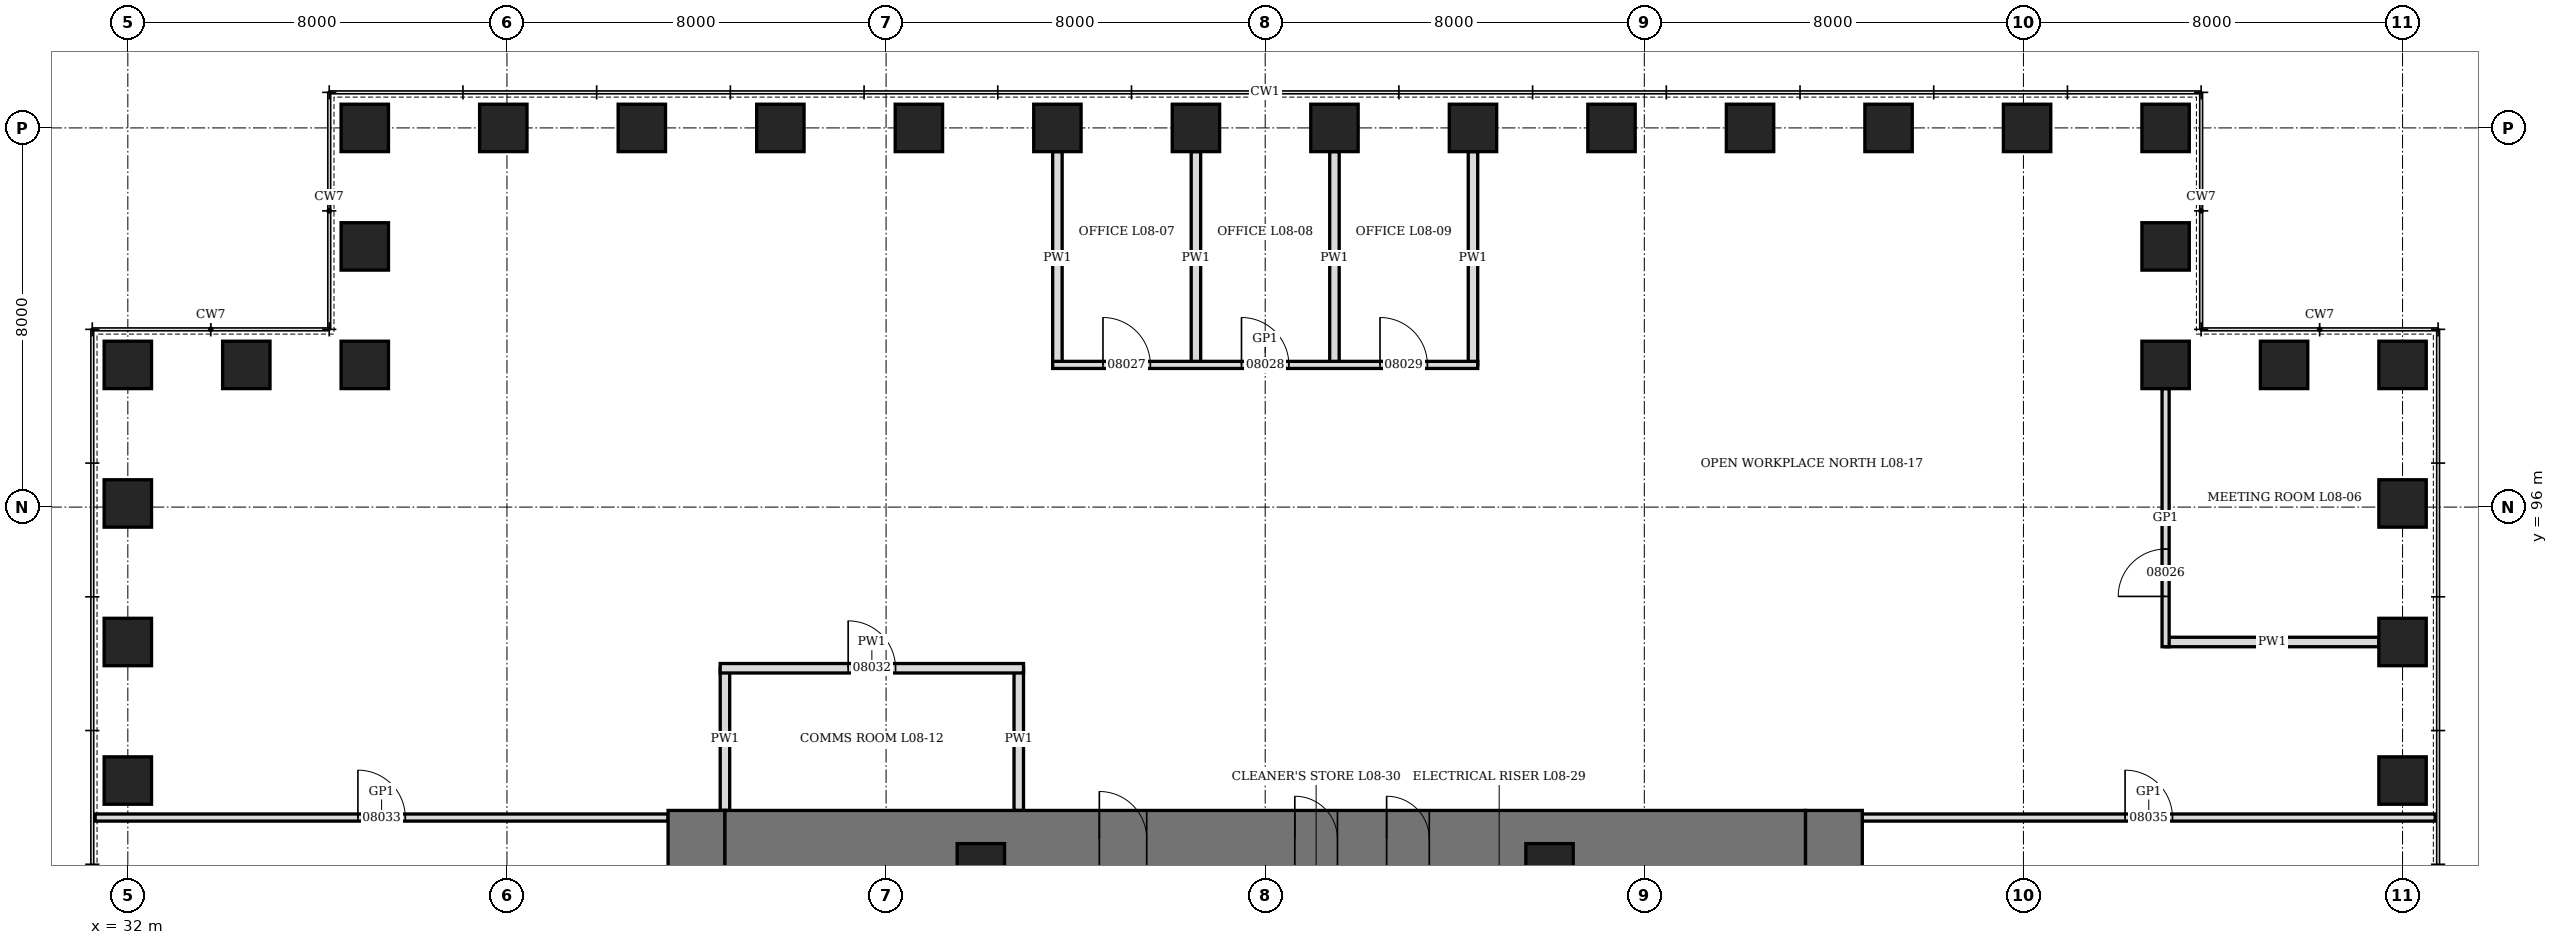
"""IFC4 building model, lengths in metres.
Left out: names, types, materials, properties, quantities, classifications, styles, units other than length and angle.
Written with IfcOpenShell. Run it as: python <this file> out.ifc"""

import sys

from ifc_helpers import new_model, si_unit, direction, frame, frame_2d, origin, origin_2d, place, context, subcontext, project, spatial, rectangle, hollow_rectangle, extrude, element, fill, save


model = new_model("IFC4")
c1 = context("Model", 3, precision=1e-05, world=origin(), true_north=direction((0.0, 1.0)))
c2 = subcontext(c1, "Body", "Model", "MODEL_VIEW")
j1 = project(units=[si_unit("LENGTHUNIT", "METRE"), si_unit("PLANEANGLEUNIT", "RADIAN")], contexts=[c1])
p1 = place(None, origin())
s1 = spatial("IfcSite", under=j1, at=p1, CompositionType="ELEMENT")
p2 = place(p1, origin())
s2 = spatial("IfcBuilding", under=s1, at=p2, CompositionType="ELEMENT")
p3 = place(p2, frame((0.0, 0.0, 43.3)))
s3 = spatial("IfcBuildingStorey", under=s2, at=p3, CompositionType="ELEMENT", Elevation=43.3)
for number, where, z_axis, x_axis in (
    (1, (80.0, 90.231, 0.0), (0.0, 0.0, 1.0), (0.0, 1.0, 0.0)),
    (2, (80.0, 93.154, 0.0), (0.0, 0.0, 1.0), (0.0, 1.0, 0.0)),
    (3, (80.0, 96.077, 0.0), (0.0, 0.0, 1.0), (0.0, 1.0, 0.0)),
    (4, (80.0, 99.0, 0.0), (0.0, 0.0, 1.0), (1.0, 0.0, 0.0)),
    (5, (77.5, 99.0, 0.0), (0.0, 0.0, 1.0), (1.0, 0.0, 0.0)),
    (6, (75.0, 99.0, 0.0), (0.0, 0.0, 1.0), (0.0, 1.0, 0.0)),
    (7, (75.0, 101.5, 0.0), (0.0, 0.0, 1.0), (0.0, 1.0, 0.0)),
    (8, (75.0, 104.0, 0.0), (0.0, 0.0, 1.0), (1.0, 0.0, 0.0)),
    (9, (72.077, 104.0, 0.0), (0.0, 0.0, 1.0), (1.0, 0.0, 0.0)),
    (10, (69.154, 104.0, 0.0), (0.0, 0.0, 1.0), (1.0, 0.0, 0.0)),
    (11, (66.231, 104.0, 0.0), (0.0, 0.0, 1.0), (1.0, 0.0, 0.0)),
    (12, (63.308, 104.0, 0.0), (0.0, 0.0, 1.0), (1.0, 0.0, 0.0)),
    (13, (60.385, 104.0, 0.0), (0.0, 0.0, 1.0), (1.0, 0.0, 0.0)),
    (14, (57.461, 104.0, 0.0), (0.0, 0.0, 1.0), (1.0, 0.0, 0.0)),
    (15, (54.539, 104.0, 0.0), (0.0, 0.0, 1.0), (1.0, 0.0, 0.0)),
    (16, (51.615, 104.0, 0.0), (0.0, 0.0, 1.0), (1.0, 0.0, 0.0)),
    (17, (48.692, 104.0, 0.0), (0.0, 0.0, 1.0), (1.0, 0.0, 0.0)),
    (18, (45.769, 104.0, 0.0), (0.0, 0.0, 1.0), (1.0, 0.0, 0.0)),
    (19, (42.846, 104.0, 0.0), (0.0, 0.0, 1.0), (1.0, 0.0, 0.0)),
    (20, (39.923, 104.0, 0.0), (0.0, 0.0, 1.0), (1.0, 0.0, 0.0)),
    (21, (37.0, 104.0, 0.0), (0.0, 0.0, 1.0), (0.0, 1.0, 0.0)),
    (22, (37.0, 101.5, 0.0), (0.0, 0.0, 1.0), (0.0, 1.0, 0.0)),
    (23, (37.0, 99.0, 0.0), (0.0, 0.0, 1.0), (1.0, 0.0, 0.0)),
    (24, (34.5, 99.0, 0.0), (0.0, 0.0, 1.0), (1.0, 0.0, 0.0)),
    (25, (32.0, 99.0, 0.0), (0.0, 0.0, 1.0), (0.0, 1.0, 0.0)),
    (26, (32.0, 96.077, 0.0), (0.0, 0.0, 1.0), (0.0, 1.0, 0.0)),
    (27, (32.0, 93.154, 0.0), (0.0, 0.0, 1.0), (0.0, 1.0, 0.0)),
    (28, (32.0, 90.231, 0.0), (0.0, 0.0, 1.0), (0.0, 1.0, 0.0)),
):
    element("IfcColumn", number, at=place(p3, frame(where, z_axis=z_axis, x_axis=x_axis)), inside=s3, PredefinedType="COLUMN", context=c2, shape_type="SweptSolid", body=[
        extrude(hollow_rectangle(XDim=1.0, YDim=1.0, WallThickness=0.25, at=origin_2d()), origin(), (0.0, 0.0, 1.0), 4.2),
    ])
p4 = place(p3, frame((44.0, 70.4, 0.0), z_axis=(0.0, 0.0, 1.0), x_axis=(0.0, 1.0, 0.0)))
e29 = element("IfcWall", 29, at=p4, inside=s3, PredefinedType="SHEAR", context=c2, shape_type="SweptSolid", body=[
    extrude(rectangle(XDim=19.2, YDim=1.2, at=frame_2d((9.6, 0.0))), origin(), (0.0, 0.0, 1.0), 4.2),
])
p5 = place(p4, frame((8.6, 0.0, 0.0)))
e30 = element("IfcOpeningElement", 30, at=p5, cuts=e29, PredefinedType="OPENING", context=c2, shape_type="SweptSolid", body=[
    extrude(rectangle(XDim=2.0, YDim=2.4, at=frame_2d((1.0, 1.2))), frame((0.0, 0.61, 0.0), z_axis=(0.0, -1.0, 0.0), x_axis=(1.0, 0.0, 0.0)), (0.0, 0.0, 1.0), 1.22),
])
p6 = place(p3, frame((68.0, 70.4, 0.0), z_axis=(0.0, 0.0, 1.0), x_axis=(0.0, 1.0, 0.0)))
e31 = element("IfcWall", 31, at=p6, inside=s3, PredefinedType="SHEAR", context=c2, shape_type="SweptSolid", body=[
    extrude(rectangle(XDim=19.2, YDim=1.2, at=frame_2d((9.6, 0.0))), origin(), (0.0, 0.0, 1.0), 4.2),
])
p7 = place(p6, frame((8.6, 0.0, 0.0)))
e32 = element("IfcOpeningElement", 32, at=p7, cuts=e31, PredefinedType="OPENING", context=c2, shape_type="SweptSolid", body=[
    extrude(rectangle(XDim=2.0, YDim=2.4, at=frame_2d((1.0, 1.2))), frame((0.0, 0.61, 0.0), z_axis=(0.0, -1.0, 0.0), x_axis=(1.0, 0.0, 0.0)), (0.0, 0.0, 1.0), 1.22),
])
p8 = place(p3, frame((44.6, 89.0, 0.0), z_axis=(0.0, 0.0, 1.0), x_axis=(1.0, 0.0, 0.0)))
e33 = element("IfcWall", 33, at=p8, inside=s3, PredefinedType="SHEAR", context=c2, shape_type="SweptSolid", body=[
    extrude(rectangle(XDim=22.8, YDim=1.2, at=frame_2d((11.4, 0.0))), origin(), (0.0, 0.0, 1.0), 4.2),
])
p9 = place(p8, frame((7.9, 0.0, 0.0)))
e34 = element("IfcOpeningElement", 34, at=p9, cuts=e33, PredefinedType="OPENING", context=c2, shape_type="SweptSolid", body=[
    extrude(rectangle(XDim=1.0, YDim=2.1, at=frame_2d((0.5, 1.05))), frame((0.0, 0.61, 0.0), z_axis=(0.0, -1.0, 0.0), x_axis=(1.0, 0.0, 0.0)), (0.0, 0.0, 1.0), 1.22),
])
p10 = place(p8, frame((12.025, 0.0, 0.0)))
e35 = element("IfcOpeningElement", 35, at=p10, cuts=e33, PredefinedType="OPENING", context=c2, shape_type="SweptSolid", body=[
    extrude(rectangle(XDim=0.9, YDim=2.1, at=frame_2d((0.45, 1.05))), frame((0.0, 0.61, 0.0), z_axis=(0.0, -1.0, 0.0), x_axis=(1.0, 0.0, 0.0)), (0.0, 0.0, 1.0), 1.22),
])
p11 = place(p8, frame((13.962, 0.0, 0.0)))
e36 = element("IfcOpeningElement", 36, at=p11, cuts=e33, PredefinedType="OPENING", context=c2, shape_type="SweptSolid", body=[
    extrude(rectangle(XDim=0.9, YDim=2.1, at=frame_2d((0.45, 1.05))), frame((0.0, 0.61, 0.0), z_axis=(0.0, -1.0, 0.0), x_axis=(1.0, 0.0, 0.0)), (0.0, 0.0, 1.0), 1.22),
])
for number, where, z_axis, x_axis in (
    (37, (50.0, 88.4, 0.0), (0.0, 0.0, 1.0), (1.0, 0.0, 0.0)),
    (38, (62.0, 88.4, 0.0), (0.0, 0.0, 1.0), (1.0, 0.0, 0.0)),
):
    element("IfcColumn", number, at=place(p3, frame(where, z_axis=z_axis, x_axis=x_axis)), inside=s3, PredefinedType="COLUMN", context=c2, shape_type="SweptSolid", body=[
        extrude(hollow_rectangle(XDim=1.0, YDim=1.0, WallThickness=0.15, at=origin_2d()), origin(), (0.0, 0.0, 1.0), 4.2),
    ])
p12 = place(p3, frame((75.0, 93.154, 0.0), z_axis=(0.0, 0.0, 1.0), x_axis=(1.0, 0.0, 0.0)))
e39 = element("IfcWall", 39, at=p12, inside=s3, PredefinedType="PARTITIONING", context=c2, shape_type="SweptSolid", body=[
    extrude(rectangle(XDim=4.5, YDim=0.2, at=frame_2d((2.25, 0.0))), origin(), (0.0, 0.0, 1.0), 3.428),
])
for number, where, z_axis, x_axis in (
    (40, (51.615, 99.0, 0.0), (0.0, 0.0, 1.0), (0.0, 1.0, 0.0)),
    (41, (54.539, 99.0, 0.0), (0.0, 0.0, 1.0), (0.0, 1.0, 0.0)),
    (42, (57.461, 99.0, 0.0), (0.0, 0.0, 1.0), (0.0, 1.0, 0.0)),
    (43, (60.385, 99.0, 0.0), (0.0, 0.0, 1.0), (0.0, 1.0, 0.0)),
):
    element("IfcWall", number, at=place(p3, frame(where, z_axis=z_axis, x_axis=x_axis)), inside=s3, PredefinedType="PARTITIONING", context=c2, shape_type="SweptSolid", body=[
        extrude(rectangle(XDim=4.5, YDim=0.2, at=frame_2d((2.25, 0.0))), origin(), (0.0, 0.0, 1.0), 3.278),
    ])
for number, where, z_axis, x_axis in (
    (44, (44.6, 89.6, 0.0), (0.0, 0.0, 1.0), (0.0, 1.0, 0.0)),
    (45, (50.8, 89.6, 0.0), (0.0, 0.0, 1.0), (0.0, 1.0, 0.0)),
):
    element("IfcWall", number, at=place(p3, frame(where, z_axis=z_axis, x_axis=x_axis)), inside=s3, PredefinedType="PARTITIONING", context=c2, shape_type="SweptSolid", body=[
        extrude(rectangle(XDim=3.0, YDim=0.2, at=frame_2d((1.5, 0.0))), origin(), (0.0, 0.0, 1.0), 4.04),
    ])
p13 = place(p3, frame((31.31, 89.45, 0.0), z_axis=(0.0, 0.0, 1.0), x_axis=(1.0, 0.0, 0.0)))
e46 = element("IfcWall", 46, at=p13, inside=s3, PredefinedType="PARTITIONING", context=c2, shape_type="SweptSolid", body=[
    extrude(rectangle(XDim=12.09, YDim=0.15, at=frame_2d((6.045, 0.0))), origin(), (0.0, 0.0, 1.0), 4.04),
])
p14 = place(p13, frame((5.545, 0.0, 0.0)))
e47 = element("IfcOpeningElement", 47, at=p14, cuts=e46, PredefinedType="OPENING", context=c2, shape_type="SweptSolid", body=[
    extrude(rectangle(XDim=1.0, YDim=2.4, at=frame_2d((0.5, 1.2))), frame((0.0, 0.085, 0.0), z_axis=(0.0, -1.0, 0.0), x_axis=(1.0, 0.0, 0.0)), (0.0, 0.0, 1.0), 0.17),
])
p15 = place(p3, frame((68.6, 89.45, 0.0), z_axis=(0.0, 0.0, 1.0), x_axis=(1.0, 0.0, 0.0)))
e48 = element("IfcWall", 48, at=p15, inside=s3, PredefinedType="PARTITIONING", context=c2, shape_type="SweptSolid", body=[
    extrude(rectangle(XDim=12.09, YDim=0.15, at=frame_2d((6.045, 0.0))), origin(), (0.0, 0.0, 1.0), 4.04),
])
p16 = place(p15, frame((5.545, 0.0, 0.0)))
e49 = element("IfcOpeningElement", 49, at=p16, cuts=e48, PredefinedType="OPENING", context=c2, shape_type="SweptSolid", body=[
    extrude(rectangle(XDim=1.0, YDim=2.4, at=frame_2d((0.5, 1.2))), frame((0.0, 0.085, 0.0), z_axis=(0.0, -1.0, 0.0), x_axis=(1.0, 0.0, 0.0)), (0.0, 0.0, 1.0), 0.17),
])
p17 = place(p3, frame((44.5, 92.6, 0.0), z_axis=(0.0, 0.0, 1.0), x_axis=(1.0, 0.0, 0.0)))
e50 = element("IfcWall", 50, at=p17, inside=s3, PredefinedType="PARTITIONING", context=c2, shape_type="SweptSolid", body=[
    extrude(rectangle(XDim=6.4, YDim=0.2, at=frame_2d((3.2, 0.0))), origin(), (0.0, 0.0, 1.0), 4.04),
])
p18 = place(p17, frame((2.7, 0.0, 0.0)))
e51 = element("IfcOpeningElement", 51, at=p18, cuts=e50, PredefinedType="OPENING", context=c2, shape_type="SweptSolid", body=[
    extrude(rectangle(XDim=1.0, YDim=2.1, at=frame_2d((0.5, 1.05))), frame((0.0, 0.11, 0.0), z_axis=(0.0, -1.0, 0.0), x_axis=(1.0, 0.0, 0.0)), (0.0, 0.0, 1.0), 0.22),
])
p19 = place(p3, frame((51.515, 99.0, 0.0), z_axis=(0.0, 0.0, 1.0), x_axis=(1.0, 0.0, 0.0)))
e52 = element("IfcWall", 52, at=p19, inside=s3, PredefinedType="PARTITIONING", context=c2, shape_type="SweptSolid", body=[
    extrude(rectangle(XDim=8.969, YDim=0.15, at=frame_2d((4.485, 0.0))), origin(), (0.0, 0.0, 1.0), 4.04),
])
p20 = place(p19, frame((1.062, 0.0, 0.0)))
e53 = element("IfcOpeningElement", 53, at=p20, cuts=e52, PredefinedType="OPENING", context=c2, shape_type="SweptSolid", body=[
    extrude(rectangle(XDim=1.0, YDim=2.1, at=frame_2d((0.5, 1.05))), frame((0.0, 0.085, 0.0), z_axis=(0.0, -1.0, 0.0), x_axis=(1.0, 0.0, 0.0)), (0.0, 0.0, 1.0), 0.17),
])
p21 = place(p19, frame((3.985, 0.0, 0.0)))
e54 = element("IfcOpeningElement", 54, at=p21, cuts=e52, PredefinedType="OPENING", context=c2, shape_type="SweptSolid", body=[
    extrude(rectangle(XDim=1.0, YDim=2.1, at=frame_2d((0.5, 1.05))), frame((0.0, 0.085, 0.0), z_axis=(0.0, -1.0, 0.0), x_axis=(1.0, 0.0, 0.0)), (0.0, 0.0, 1.0), 0.17),
])
p22 = place(p19, frame((6.908, 0.0, 0.0)))
e55 = element("IfcOpeningElement", 55, at=p22, cuts=e52, PredefinedType="OPENING", context=c2, shape_type="SweptSolid", body=[
    extrude(rectangle(XDim=1.0, YDim=2.1, at=frame_2d((0.5, 1.05))), frame((0.0, 0.085, 0.0), z_axis=(0.0, -1.0, 0.0), x_axis=(1.0, 0.0, 0.0)), (0.0, 0.0, 1.0), 0.17),
])
p23 = place(p3, frame((75.0, 93.054, 0.0), z_axis=(0.0, 0.0, 1.0), x_axis=(0.0, 1.0, 0.0)))
e56 = element("IfcWall", 56, at=p23, inside=s3, PredefinedType="PARTITIONING", context=c2, shape_type="SweptSolid", body=[
    extrude(rectangle(XDim=5.446, YDim=0.15, at=frame_2d((2.723, 0.0))), origin(), (0.0, 0.0, 1.0), 4.04),
])
p24 = place(p23, frame((1.062, 0.0, 0.0)))
e57 = element("IfcOpeningElement", 57, at=p24, cuts=e56, PredefinedType="OPENING", context=c2, shape_type="SweptSolid", body=[
    extrude(rectangle(XDim=1.0, YDim=2.4, at=frame_2d((0.5, 1.2))), frame((0.0, 0.085, 0.0), z_axis=(0.0, -1.0, 0.0), x_axis=(1.0, 0.0, 0.0)), (0.0, 0.0, 1.0), 0.17),
])
p25 = place(p9, origin())
e58 = element("IfcDoor", 58, at=p25, inside=s3, OperationType="SINGLE_SWING_LEFT", PredefinedType="DOOR", context=c2, shape_type="SweptSolid", body=[
    extrude(rectangle(XDim=1.0, YDim=2.1, at=frame_2d((0.5, 1.05))), frame((0.0, 0.35, 0.0), z_axis=(0.0, -1.0, 0.0), x_axis=(1.0, 0.0, 0.0)), (0.0, 0.0, 1.0), 0.7),
])
fill(e34, e58)
p26 = place(p10, origin())
e59 = element("IfcDoor", 59, at=p26, inside=s3, OperationType="SINGLE_SWING_LEFT", PredefinedType="DOOR", context=c2, shape_type="SweptSolid", body=[
    extrude(rectangle(XDim=0.9, YDim=2.1, at=frame_2d((0.45, 1.05))), frame((0.0, 0.35, 0.0), z_axis=(0.0, -1.0, 0.0), x_axis=(1.0, 0.0, 0.0)), (0.0, 0.0, 1.0), 0.7),
])
fill(e35, e59)
p27 = place(p11, origin())
e60 = element("IfcDoor", 60, at=p27, inside=s3, OperationType="SINGLE_SWING_LEFT", PredefinedType="DOOR", context=c2, shape_type="SweptSolid", body=[
    extrude(rectangle(XDim=0.9, YDim=2.1, at=frame_2d((0.45, 1.05))), frame((0.0, 0.35, 0.0), z_axis=(0.0, -1.0, 0.0), x_axis=(1.0, 0.0, 0.0)), (0.0, 0.0, 1.0), 0.7),
])
fill(e36, e60)
p28 = place(p24, origin())
e61 = element("IfcDoor", 61, at=p28, inside=s3, OperationType="SINGLE_SWING_RIGHT", PredefinedType="DOOR", context=c2, shape_type="SweptSolid", body=[
    extrude(rectangle(XDim=1.0, YDim=2.4, at=frame_2d((0.5, 1.2))), frame((0.0, 0.075, 0.0), z_axis=(0.0, -1.0, 0.0), x_axis=(1.0, 0.0, 0.0)), (0.0, 0.0, 1.0), 0.149),
])
fill(e57, e61)
p29 = place(p20, origin())
e62 = element("IfcDoor", 62, at=p29, inside=s3, OperationType="SINGLE_SWING_LEFT", PredefinedType="DOOR", context=c2, shape_type="SweptSolid", body=[
    extrude(rectangle(XDim=1.0, YDim=2.1, at=frame_2d((0.5, 1.05))), frame((0.0, 0.075, 0.0), z_axis=(0.0, -1.0, 0.0), x_axis=(1.0, 0.0, 0.0)), (0.0, 0.0, 1.0), 0.149),
])
fill(e53, e62)
p30 = place(p21, origin())
e63 = element("IfcDoor", 63, at=p30, inside=s3, OperationType="SINGLE_SWING_LEFT", PredefinedType="DOOR", context=c2, shape_type="SweptSolid", body=[
    extrude(rectangle(XDim=1.0, YDim=2.1, at=frame_2d((0.5, 1.05))), frame((0.0, 0.075, 0.0), z_axis=(0.0, -1.0, 0.0), x_axis=(1.0, 0.0, 0.0)), (0.0, 0.0, 1.0), 0.149),
])
fill(e54, e63)
p31 = place(p22, origin())
e64 = element("IfcDoor", 64, at=p31, inside=s3, OperationType="SINGLE_SWING_LEFT", PredefinedType="DOOR", context=c2, shape_type="SweptSolid", body=[
    extrude(rectangle(XDim=1.0, YDim=2.1, at=frame_2d((0.5, 1.05))), frame((0.0, 0.075, 0.0), z_axis=(0.0, -1.0, 0.0), x_axis=(1.0, 0.0, 0.0)), (0.0, 0.0, 1.0), 0.149),
])
fill(e55, e64)
p32 = place(p18, origin())
e65 = element("IfcDoor", 65, at=p32, inside=s3, OperationType="SINGLE_SWING_LEFT", PredefinedType="DOOR", context=c2, shape_type="SweptSolid", body=[
    extrude(rectangle(XDim=1.0, YDim=2.1, at=frame_2d((0.5, 1.05))), frame((0.0, 0.1, 0.0), z_axis=(0.0, -1.0, 0.0), x_axis=(1.0, 0.0, 0.0)), (0.0, 0.0, 1.0), 0.199),
])
fill(e51, e65)
p33 = place(p14, origin())
e66 = element("IfcDoor", 66, at=p33, inside=s3, OperationType="SINGLE_SWING_RIGHT", PredefinedType="DOOR", context=c2, shape_type="SweptSolid", body=[
    extrude(rectangle(XDim=1.0, YDim=2.4, at=frame_2d((0.5, 1.2))), frame((0.0, 0.075, 0.0), z_axis=(0.0, -1.0, 0.0), x_axis=(1.0, 0.0, 0.0)), (0.0, 0.0, 1.0), 0.149),
])
fill(e47, e66)
p34 = place(p16, origin())
e67 = element("IfcDoor", 67, at=p34, inside=s3, OperationType="SINGLE_SWING_RIGHT", PredefinedType="DOOR", context=c2, shape_type="SweptSolid", body=[
    extrude(rectangle(XDim=1.0, YDim=2.4, at=frame_2d((0.5, 1.2))), frame((0.0, 0.075, 0.0), z_axis=(0.0, -1.0, 0.0), x_axis=(1.0, 0.0, 0.0)), (0.0, 0.0, 1.0), 0.149),
])
fill(e49, e67)
save(model, sys.argv[1])
